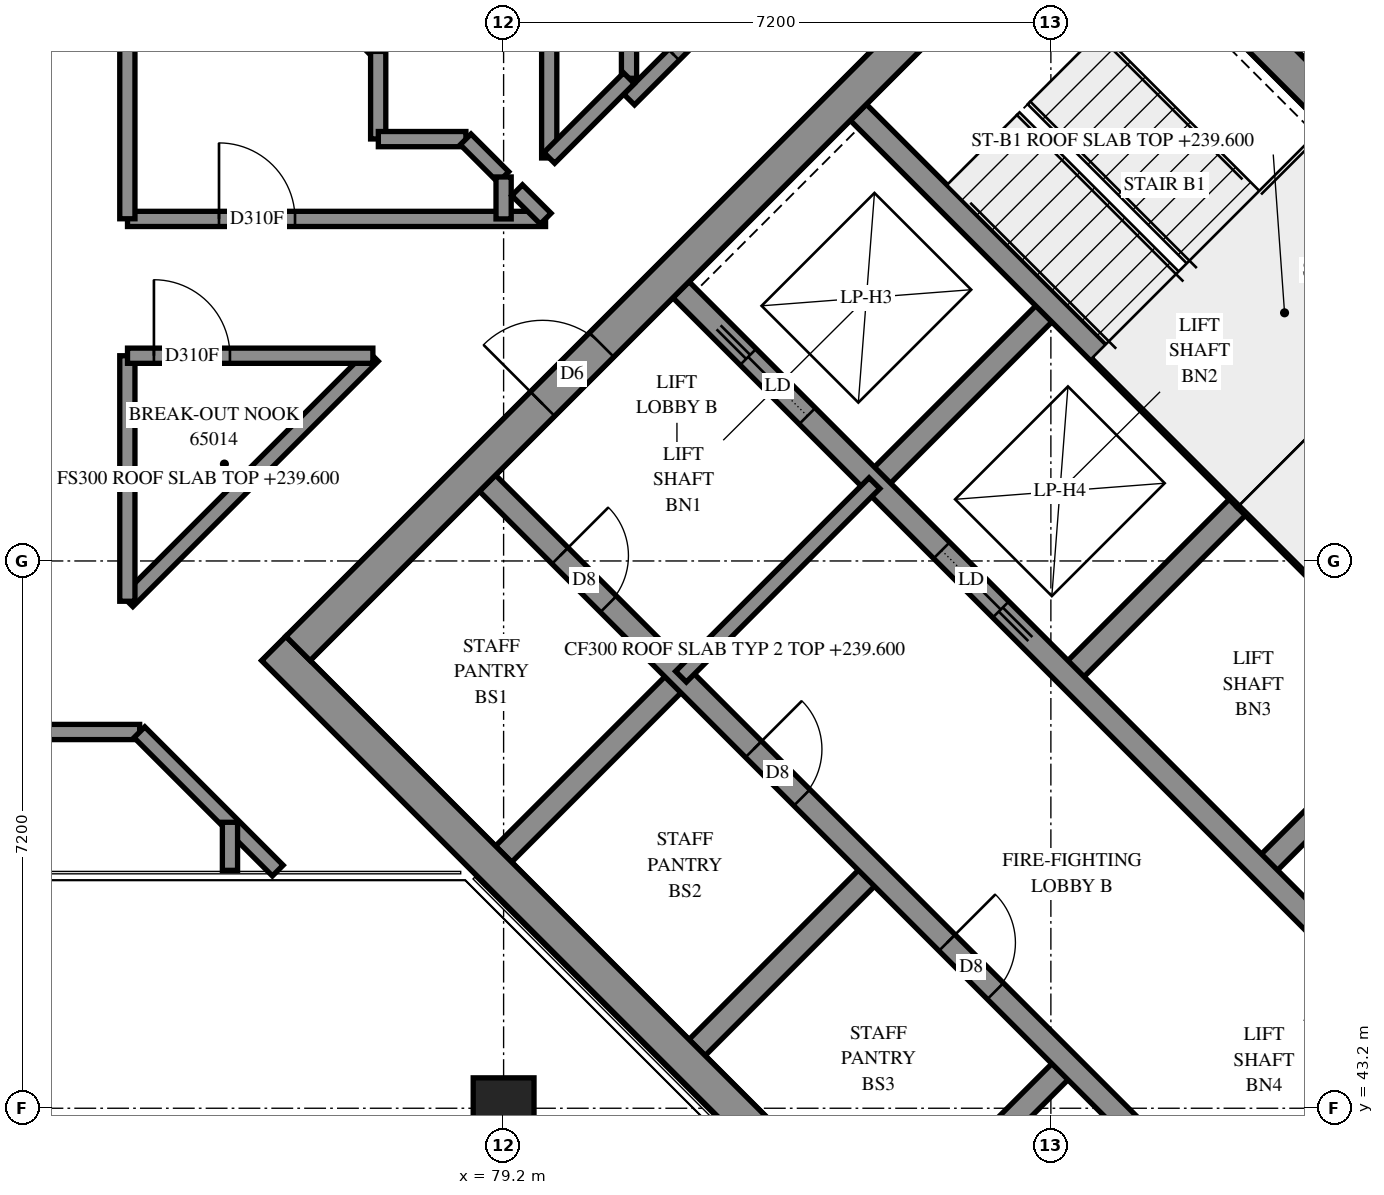
"""IFC4 building model, lengths in metres.
Left out: names, types, materials, properties, quantities, classifications, styles, units other than length and angle.
Written with IfcOpenShell. Run it as: python <this file> out.ifc"""

import sys

from ifc_helpers import new_model, si_unit, direction, frame, frame_2d, origin, origin_2d, place, context, subcontext, project, spatial, rectangle, extrude, element, fill, save


model = new_model("IFC4")
c1 = context("Model", 3, precision=1e-05, world=origin(), true_north=direction((0.0, 1.0)))
c2 = subcontext(c1, "Body", "Model", "MODEL_VIEW")
j1 = project(units=[si_unit("LENGTHUNIT", "METRE"), si_unit("PLANEANGLEUNIT", "RADIAN")], contexts=[c1])
p1 = place(None, origin())
s1 = spatial("IfcSite", under=j1, at=p1, CompositionType="ELEMENT")
p2 = place(p1, origin())
s2 = spatial("IfcBuilding", under=s1, at=p2, CompositionType="ELEMENT")
p3 = place(p2, frame((0.0, 0.0, 239.6)))
s3 = spatial("IfcBuildingStorey", under=s2, at=p3, CompositionType="ELEMENT", Elevation=239.6)
p4 = place(p3, frame((79.2, 43.2, 0.0), z_axis=(0.0, 0.0, 1.0), x_axis=(1.0, 0.0, 0.0)))
e1 = element("IfcColumn", 1, at=p4, inside=s3, PredefinedType="COLUMN", context=c2, shape_type="SweptSolid", body=[
    extrude(rectangle(XDim=0.8, YDim=0.8, at=origin_2d()), origin(), (0.0, 0.0, 1.0), 3.9),
])
p5 = place(p3, frame((76.177, 49.249, -0.3), z_axis=(0.0, 0.0, 1.0), x_axis=(0.7071100491, -0.7071035132, 0.0)))
e2 = element("IfcWall", 2, at=p5, inside=s3, PredefinedType="SHEAR", context=c2, shape_type="SweptSolid", body=[
    extrude(rectangle(XDim=15.3, YDim=0.45, at=frame_2d((7.65, 0.0))), origin(), (0.0, 0.0, 1.0), 3.5),
])
p6 = place(p3, frame((86.678, 59.749, -0.3), z_axis=(0.0, 0.0, 1.0), x_axis=(0.7071035132, -0.7071100491, 0.0)))
e3 = element("IfcWall", 3, at=p6, inside=s3, PredefinedType="SHEAR", context=c2, shape_type="SweptSolid", body=[
    extrude(rectangle(XDim=15.3, YDim=0.45, at=frame_2d((7.65, 0.0))), origin(), (0.0, 0.0, 1.0), 3.5),
])
p7 = place(p6, frame((10.45, 0.0, 0.3)))
e4 = element("IfcOpeningElement", 4, at=p7, cuts=e3, PredefinedType="OPENING", context=c2, shape_type="SweptSolid", body=[
    extrude(rectangle(XDim=0.8, YDim=2.1, at=frame_2d((0.4, 1.05))), frame((0.0, 0.235, 0.0), z_axis=(0.0, -1.0, 0.0), x_axis=(1.0, 0.0, 0.0)), (0.0, 0.0, 1.0), 0.47),
])
p8 = place(p3, frame((76.495, 49.249, -0.3), z_axis=(0.0, 0.0, 1.0), x_axis=(0.7071067812, 0.7071067812, 0.0)))
e5 = element("IfcWall", 5, at=p8, inside=s3, PredefinedType="SHEAR", context=c2, shape_type="SweptSolid", body=[
    extrude(rectangle(XDim=14.4, YDim=0.45, at=frame_2d((7.2, 0.0))), origin(), (0.0, 0.0, 1.0), 3.5),
])
p9 = place(p8, frame((4.55, 0.0, 0.3)))
e6 = element("IfcOpeningElement", 6, at=p9, cuts=e5, PredefinedType="OPENING", context=c2, shape_type="SweptSolid", body=[
    extrude(rectangle(XDim=1.1, YDim=2.1, at=frame_2d((0.55, 1.05))), frame((0.0, 0.235, 0.0), z_axis=(0.0, -1.0, 0.0), x_axis=(1.0, 0.0, 0.0)), (0.0, 0.0, 1.0), 0.47),
])
p10 = place(p8, frame((11.35, 0.0, 0.3)))
e7 = element("IfcOpeningElement", 7, at=p10, cuts=e5, PredefinedType="OPENING", context=c2, shape_type="SweptSolid", body=[
    extrude(rectangle(XDim=1.1, YDim=2.1, at=frame_2d((0.55, 1.05))), frame((0.0, 0.235, 0.0), z_axis=(0.0, -1.0, 0.0), x_axis=(1.0, 0.0, 0.0)), (0.0, 0.0, 1.0), 0.47),
])
p11 = place(p3, frame((86.996, 38.748, -0.3), z_axis=(0.0, 0.0, 1.0), x_axis=(0.7071067812, 0.7071067812, 0.0)))
e8 = element("IfcWall", 8, at=p11, inside=s3, PredefinedType="SHEAR", context=c2, shape_type="SweptSolid", body=[
    extrude(rectangle(XDim=14.4, YDim=0.45, at=frame_2d((7.2, 0.0))), origin(), (0.0, 0.0, 1.0), 3.5),
])
p12 = place(p11, frame((4.55, 0.0, 0.3)))
e9 = element("IfcOpeningElement", 9, at=p12, cuts=e8, PredefinedType="OPENING", context=c2, shape_type="SweptSolid", body=[
    extrude(rectangle(XDim=1.1, YDim=2.1, at=frame_2d((0.55, 1.05))), frame((0.0, 0.235, 0.0), z_axis=(0.0, -1.0, 0.0), x_axis=(1.0, 0.0, 0.0)), (0.0, 0.0, 1.0), 0.47),
])
p13 = place(p11, frame((11.35, 0.0, 0.3)))
e10 = element("IfcOpeningElement", 10, at=p13, cuts=e8, PredefinedType="OPENING", context=c2, shape_type="SweptSolid", body=[
    extrude(rectangle(XDim=1.1, YDim=2.1, at=frame_2d((0.55, 1.05))), frame((0.0, 0.235, 0.0), z_axis=(0.0, -1.0, 0.0), x_axis=(1.0, 0.0, 0.0)), (0.0, 0.0, 1.0), 0.47),
])
for number, where, z_axis, x_axis in (
    (11, (79.2, 46.544, 0.0), (0.0, 0.0, 1.0), (0.707, 0.707, 0.0)),
    (12, (84.079, 51.423, 0.0), (0.0, 0.0, 1.0), (0.707, 0.707, 0.0)),
):
    element("IfcWall", number, at=place(p3, frame(where, z_axis=z_axis, x_axis=x_axis)), inside=s3, PredefinedType="SOLIDWALL", context=c2, shape_type="SweptSolid", body=[
        extrude(rectangle(XDim=3.3, YDim=0.3, at=frame_2d((1.65, 0.0))), origin(), (0.0, 0.0, 1.0), 3.9),
    ])
p14 = place(p3, frame((81.746, 43.999, 0.0), z_axis=(0.0, 0.0, 1.0), x_axis=(0.7071067812, 0.7071067812, 0.0)))
e13 = element("IfcWall", 13, at=p14, inside=s3, PredefinedType="SOLIDWALL", context=c2, shape_type="SweptSolid", body=[
    extrude(rectangle(XDim=3.3, YDim=0.3, at=frame_2d((1.65, 0.0))), origin(), (0.0, 0.0, 1.0), 3.9),
])
p15 = place(p3, frame((86.625, 48.878, 0.0), z_axis=(0.0, 0.0, 1.0), x_axis=(0.7071067812, 0.7071067812, 0.0)))
e14 = element("IfcWall", 14, at=p15, inside=s3, PredefinedType="SOLIDWALL", context=c2, shape_type="SweptSolid", body=[
    extrude(rectangle(XDim=3.3, YDim=0.3, at=frame_2d((1.65, 0.0))), origin(), (0.0, 0.0, 1.0), 3.9),
])
p16 = place(p3, frame((84.291, 41.453, 0.0), z_axis=(0.0, 0.0, 1.0), x_axis=(0.7071067812, 0.7071067812, 0.0)))
e15 = element("IfcWall", 15, at=p16, inside=s3, PredefinedType="SOLIDWALL", context=c2, shape_type="SweptSolid", body=[
    extrude(rectangle(XDim=3.3, YDim=0.3, at=frame_2d((1.65, 0.0))), origin(), (0.0, 0.0, 1.0), 3.9),
])
p17 = place(p3, frame((89.17, 46.332, 0.0), z_axis=(0.0, 0.0, 1.0), x_axis=(0.7071067812, 0.7071067812, 0.0)))
e16 = element("IfcWall", 16, at=p17, inside=s3, PredefinedType="SOLIDWALL", context=c2, shape_type="SweptSolid", body=[
    extrude(rectangle(XDim=3.3, YDim=0.3, at=frame_2d((1.65, 0.0))), origin(), (0.0, 0.0, 1.0), 3.9),
])
p18 = place(p3, frame((78.988, 51.423, 0.0), z_axis=(0.0, 0.0, 1.0), x_axis=(0.7071067812, -0.7071067812, 0.0)))
e17 = element("IfcWall", 17, at=p18, inside=s3, PredefinedType="SOLIDWALL", context=c2, shape_type="SweptSolid", body=[
    extrude(rectangle(XDim=14.4, YDim=0.3, at=frame_2d((7.2, 0.0))), origin(), (0.0, 0.0, 1.0), 3.9),
])
p19 = place(p18, frame((1.35, 0.0, 0.0)))
e18 = element("IfcOpeningElement", 18, at=p19, cuts=e17, PredefinedType="OPENING", context=c2, shape_type="SweptSolid", body=[
    extrude(rectangle(XDim=0.9, YDim=2.1, at=frame_2d((0.45, 1.05))), frame((0.0, 0.16, 0.0), z_axis=(0.0, -1.0, 0.0), x_axis=(1.0, 0.0, 0.0)), (0.0, 0.0, 1.0), 0.32),
])
p20 = place(p18, frame((4.95, 0.0, 0.0)))
e19 = element("IfcOpeningElement", 19, at=p20, cuts=e17, PredefinedType="OPENING", context=c2, shape_type="SweptSolid", body=[
    extrude(rectangle(XDim=0.9, YDim=2.1, at=frame_2d((0.45, 1.05))), frame((0.0, 0.16, 0.0), z_axis=(0.0, -1.0, 0.0), x_axis=(1.0, 0.0, 0.0)), (0.0, 0.0, 1.0), 0.32),
])
p21 = place(p18, frame((8.55, 0.0, 0.0)))
e20 = element("IfcOpeningElement", 20, at=p21, cuts=e17, PredefinedType="OPENING", context=c2, shape_type="SweptSolid", body=[
    extrude(rectangle(XDim=0.9, YDim=2.1, at=frame_2d((0.45, 1.05))), frame((0.0, 0.16, 0.0), z_axis=(0.0, -1.0, 0.0), x_axis=(1.0, 0.0, 0.0)), (0.0, 0.0, 1.0), 0.32),
])
p22 = place(p18, frame((12.05, 0.0, 0.0)))
e21 = element("IfcOpeningElement", 21, at=p22, cuts=e17, PredefinedType="OPENING", context=c2, shape_type="SweptSolid", body=[
    extrude(rectangle(XDim=1.1, YDim=2.1, at=frame_2d((0.55, 1.05))), frame((0.0, 0.16, 0.0), z_axis=(0.0, -1.0, 0.0), x_axis=(1.0, 0.0, 0.0)), (0.0, 0.0, 1.0), 0.32),
])
p23 = place(p3, frame((81.534, 53.969, 0.0), z_axis=(0.0, 0.0, 1.0), x_axis=(0.707103309, -0.7071102534, 0.0)))
e22 = element("IfcWall", 22, at=p23, inside=s3, PredefinedType="SOLIDWALL", context=c2, shape_type="SweptSolid", body=[
    extrude(rectangle(XDim=14.4, YDim=0.3, at=frame_2d((7.2, 0.0))), origin(), (0.0, 0.0, 1.0), 3.9),
])
p24 = place(p23, frame((1.25, 0.0, 0.0)))
e23 = element("IfcOpeningElement", 23, at=p24, cuts=e22, PredefinedType="OPENING", context=c2, shape_type="SweptSolid", body=[
    extrude(rectangle(XDim=1.1, YDim=2.1, at=frame_2d((0.55, 1.05))), frame((0.0, 0.16, 0.0), z_axis=(0.0, -1.0, 0.0), x_axis=(1.0, 0.0, 0.0)), (0.0, 0.0, 1.0), 0.32),
])
p25 = place(p23, frame((4.85, 0.0, 0.0)))
e24 = element("IfcOpeningElement", 24, at=p25, cuts=e22, PredefinedType="OPENING", context=c2, shape_type="SweptSolid", body=[
    extrude(rectangle(XDim=1.1, YDim=2.1, at=frame_2d((0.55, 1.05))), frame((0.0, 0.16, 0.0), z_axis=(0.0, -1.0, 0.0), x_axis=(1.0, 0.0, 0.0)), (0.0, 0.0, 1.0), 0.32),
])
p26 = place(p23, frame((12.05, 0.0, 0.0)))
e25 = element("IfcOpeningElement", 25, at=p26, cuts=e22, PredefinedType="OPENING", context=c2, shape_type="SweptSolid", body=[
    extrude(rectangle(XDim=1.1, YDim=2.1, at=frame_2d((0.55, 1.05))), frame((0.0, 0.16, 0.0), z_axis=(0.0, -1.0, 0.0), x_axis=(1.0, 0.0, 0.0)), (0.0, 0.0, 1.0), 0.32),
])
for number, where, z_axis, x_axis in (
    (26, (83.867, 56.302, 0.0), (0.0, 0.0, 1.0), (0.707, -0.707, 0.0)),
    (27, (88.958, 51.211, 0.0), (0.0, 0.0, 1.0), (0.707, -0.707, 0.0)),
):
    element("IfcWall", number, at=place(p3, frame(where, z_axis=z_axis, x_axis=x_axis)), inside=s3, PredefinedType="SOLIDWALL", context=c2, shape_type="SweptSolid", body=[
        extrude(rectangle(XDim=7.2, YDim=0.3, at=frame_2d((3.6, 0.0))), origin(), (0.0, 0.0, 1.0), 3.9),
    ])
p27 = place(p3, frame((88.958, 51.211, 0.0), z_axis=(0.0, 0.0, 1.0), x_axis=(0.7071067812, 0.7071067812, 0.0)))
e28 = element("IfcWall", 28, at=p27, inside=s3, PredefinedType="SOLIDWALL", context=c2, shape_type="SweptSolid", body=[
    extrude(rectangle(XDim=4.2, YDim=0.3, at=frame_2d((2.1, 0.0))), origin(), (0.0, 0.0, 1.0), 3.9),
])
p28 = place(p3, frame((81.534, 48.878, 0.0), z_axis=(0.0, 0.0, 1.0), x_axis=(0.707092892, 0.7071206701, 0.0)))
e29 = element("IfcWall", 29, at=p28, inside=s3, PredefinedType="PARTITIONING", context=c2, shape_type="SweptSolid", body=[
    extrude(rectangle(XDim=3.6, YDim=0.2, at=frame_2d((1.8, 0.0))), origin(), (0.0, 0.0, 1.0), 3.9),
])
p29 = place(p3, frame((55.352, 48.15, 0.0), z_axis=(0.0, 0.0, 1.0), x_axis=(1.0, 0.0, 0.0)))
e30 = element("IfcWall", 30, at=p29, inside=s3, PredefinedType="PARTITIONING", context=c2, shape_type="SweptSolid", body=[
    extrude(rectangle(XDim=19.06, YDim=0.2, at=frame_2d((9.53, 0.0))), origin(), (0.0, 0.0, 1.0), 3.9),
])
p30 = place(p29, frame((11.608, 0.0, 0.0)))
e31 = element("IfcOpeningElement", 31, at=p30, cuts=e30, PredefinedType="OPENING", context=c2, shape_type="SweptSolid", body=[
    extrude(rectangle(XDim=1.0, YDim=2.1, at=frame_2d((0.5, 1.05))), frame((0.0, 0.11, 0.0), z_axis=(0.0, -1.0, 0.0), x_axis=(1.0, 0.0, 0.0)), (0.0, 0.0, 1.0), 0.22),
])
p31 = place(p3, frame((80.852, 56.471, 0.0), z_axis=(0.0, 0.0, 1.0), x_axis=(0.7071067812, 0.7071067812, 0.0)))
e32 = element("IfcWall", 32, at=p31, inside=s3, PredefinedType="PARTITIONING", context=c2, shape_type="SweptSolid", body=[
    extrude(rectangle(XDim=6.684, YDim=0.2, at=frame_2d((3.342, 0.0))), origin(), (0.0, 0.0, 1.0), 3.9),
])
p32 = place(p31, frame((0.832, 0.0, 0.0)))
e33 = element("IfcOpeningElement", 33, at=p32, cuts=e32, PredefinedType="OPENING", context=c2, shape_type="SweptSolid", body=[
    extrude(rectangle(XDim=1.0, YDim=2.1, at=frame_2d((0.5, 1.05))), frame((0.0, 0.11, 0.0), z_axis=(0.0, -1.0, 0.0), x_axis=(1.0, 0.0, 0.0)), (0.0, 0.0, 1.0), 0.22),
])
p33 = place(p3, frame((74.252, 54.9, 0.0), z_axis=(0.0, 0.0, 1.0), x_axis=(1.0, 0.0, 0.0)))
e34 = element("IfcWall", 34, at=p33, inside=s3, PredefinedType="PARTITIONING", context=c2, shape_type="SweptSolid", body=[
    extrude(rectangle(XDim=5.5, YDim=0.2, at=frame_2d((2.75, 0.0))), origin(), (0.0, 0.0, 1.0), 3.9),
])
p34 = place(p33, frame((1.204, 0.0, 0.0)))
e35 = element("IfcOpeningElement", 35, at=p34, cuts=e34, PredefinedType="OPENING", context=c2, shape_type="SweptSolid", body=[
    extrude(rectangle(XDim=1.0, YDim=2.1, at=frame_2d((0.5, 1.05))), frame((0.0, 0.11, 0.0), z_axis=(0.0, -1.0, 0.0), x_axis=(1.0, 0.0, 0.0)), (0.0, 0.0, 1.0), 0.22),
])
p35 = place(p3, frame((74.25, 54.902, 0.0), z_axis=(0.0, 0.0, 1.0), x_axis=(0.0, 1.0, 0.0)))
e36 = element("IfcWall", 36, at=p35, inside=s3, PredefinedType="PARTITIONING", context=c2, shape_type="SweptSolid", body=[
    extrude(rectangle(XDim=5.5, YDim=0.2, at=frame_2d((2.75, 0.0))), origin(), (0.0, 0.0, 1.0), 3.9),
])
p36 = place(p3, frame((74.251, 49.87, 0.0), z_axis=(0.0, 0.0, 1.0), x_axis=(0.7071067812, 0.7071067812, 0.0)))
e37 = element("IfcWall", 37, at=p36, inside=s3, PredefinedType="PARTITIONING", context=c2, shape_type="SweptSolid", body=[
    extrude(rectangle(XDim=4.565, YDim=0.2, at=frame_2d((2.283, 0.0))), origin(), (0.0, 0.0, 1.0), 3.9),
])
p37 = place(p3, frame((74.447, 60.201, 0.0), z_axis=(0.0, 0.0, 1.0), x_axis=(0.7071067812, -0.7071067812, 0.0)))
e38 = element("IfcWall", 38, at=p37, inside=s3, PredefinedType="PARTITIONING", context=c2, shape_type="SweptSolid", body=[
    extrude(rectangle(XDim=4.384, YDim=0.2, at=frame_2d((2.192, 0.0))), origin(), (0.0, 0.0, 1.0), 3.9),
])
p38 = place(p3, frame((79.8, 55.702, 0.0), z_axis=(0.0, 0.0, 1.0), x_axis=(0.0, 1.0, 0.0)))
e39 = element("IfcWall", 39, at=p38, inside=s3, PredefinedType="PARTITIONING", context=c2, shape_type="SweptSolid", body=[
    extrude(rectangle(XDim=3.548, YDim=0.2, at=frame_2d((1.774, 0.0))), origin(), (0.0, 0.0, 1.0), 3.9),
])
p39 = place(p3, frame((74.25, 49.87, 0.0), z_axis=(0.0, 0.0, 1.0), x_axis=(0.0, 1.0, 0.0)))
e40 = element("IfcWall", 40, at=p39, inside=s3, PredefinedType="PARTITIONING", context=c2, shape_type="SweptSolid", body=[
    extrude(rectangle(XDim=3.23, YDim=0.2, at=frame_2d((1.615, 0.0))), origin(), (0.0, 0.0, 1.0), 3.9),
])
p40 = place(p3, frame((74.252, 53.1, 0.0), z_axis=(0.0, 0.0, 1.0), x_axis=(1.0, 0.0, 0.0)))
e41 = element("IfcWall", 41, at=p40, inside=s3, PredefinedType="PARTITIONING", context=c2, shape_type="SweptSolid", body=[
    extrude(rectangle(XDim=3.228, YDim=0.2, at=frame_2d((1.614, 0.0))), origin(), (0.0, 0.0, 1.0), 3.9),
])
p41 = place(p40, frame((0.347, 0.0, 0.0)))
e42 = element("IfcOpeningElement", 42, at=p41, cuts=e41, PredefinedType="OPENING", context=c2, shape_type="SweptSolid", body=[
    extrude(rectangle(XDim=1.0, YDim=2.1, at=frame_2d((0.5, 1.05))), frame((0.0, 0.11, 0.0), z_axis=(0.0, -1.0, 0.0), x_axis=(1.0, 0.0, 0.0)), (0.0, 0.0, 1.0), 0.22),
])
p42 = place(p3, frame((74.409, 48.147, 0.0), z_axis=(0.0, 0.0, 1.0), x_axis=(0.7071067812, -0.7071067812, 0.0)))
e43 = element("IfcWall", 43, at=p42, inside=s3, PredefinedType="PARTITIONING", context=c2, shape_type="SweptSolid", body=[
    extrude(rectangle(XDim=2.574, YDim=0.2, at=frame_2d((1.287, 0.0))), origin(), (0.0, 0.0, 1.0), 3.9),
])
p43 = place(p3, frame((80.85, 56.75, 0.0), z_axis=(0.0, 0.0, 1.0), x_axis=(0.0, 1.0, 0.0)))
e44 = element("IfcWall", 44, at=p43, inside=s3, PredefinedType="PARTITIONING", context=c2, shape_type="SweptSolid", body=[
    extrude(rectangle(XDim=2.498, YDim=0.2, at=frame_2d((1.249, 0.0))), origin(), (0.0, 0.0, 1.0), 3.9),
])
p44 = place(p3, frame((79.801, 55.703, 0.0), z_axis=(0.0, 0.0, 1.0), x_axis=(0.7071067812, 0.7071067812, 0.0)))
e45 = element("IfcWall", 45, at=p44, inside=s3, PredefinedType="PARTITIONING", context=c2, shape_type="SweptSolid", body=[
    extrude(rectangle(XDim=1.482, YDim=0.2, at=frame_2d((0.741, 0.0))), origin(), (0.0, 0.0, 1.0), 3.9),
])
for number, where, z_axis, x_axis in (
    (46, (77.55, 55.952, 0.0), (0.0, 0.0, 1.0), (0.0, 1.0, 0.0)),
    (47, (77.552, 55.95, 0.0), (0.0, 0.0, 1.0), (1.0, 0.0, 0.0)),
):
    element("IfcWall", number, at=place(p3, frame(where, z_axis=z_axis, x_axis=x_axis)), inside=s3, PredefinedType="PARTITIONING", context=c2, shape_type="SweptSolid", body=[
        extrude(rectangle(XDim=1.152, YDim=0.2, at=frame_2d((0.576, 0.0))), origin(), (0.0, 0.0, 1.0), 3.9),
    ])
p45 = place(p3, frame((78.701, 55.947, 0.0), z_axis=(0.0, 0.0, 1.0), x_axis=(0.7071067812, -0.7071067812, 0.0)))
e48 = element("IfcWall", 48, at=p45, inside=s3, PredefinedType="PARTITIONING", context=c2, shape_type="SweptSolid", body=[
    extrude(rectangle(XDim=0.701, YDim=0.2, at=frame_2d((0.351, 0.0))), origin(), (0.0, 0.0, 1.0), 3.9),
])
p46 = place(p3, frame((75.6, 46.33, 0.0), z_axis=(0.0, 0.0, 1.0), x_axis=(0.0, 1.0, 0.0)))
e49 = element("IfcWall", 49, at=p46, inside=s3, PredefinedType="PARTITIONING", context=c2, shape_type="SweptSolid", body=[
    extrude(rectangle(XDim=0.632, YDim=0.2, at=frame_2d((0.316, 0.0))), origin(), (0.0, 0.0, 1.0), 3.9),
])
p47 = place(p3, frame((79.2, 54.9, 0.0), z_axis=(0.0, 0.0, 1.0), x_axis=(0.0, 1.0, 0.0)))
e50 = element("IfcWall", 50, at=p47, inside=s3, PredefinedType="PARTITIONING", context=c2, shape_type="SweptSolid", body=[
    extrude(rectangle(XDim=0.552, YDim=0.2, at=frame_2d((0.276, 0.0))), origin(), (0.0, 0.0, 1.0), 3.9),
])
p48 = place(p3, frame((79.378, 55.278, 0.0), z_axis=(0.0, 0.0, 1.0), x_axis=(0.7089898784, -0.7052186557, 0.0)))
e51 = element("IfcWall", 51, at=p48, inside=s3, PredefinedType="PARTITIONING", context=c2, shape_type="SweptSolid", body=[
    extrude(rectangle(XDim=0.53, YDim=0.2, at=frame_2d((0.265, 0.0))), origin(), (0.0, 0.0, 1.0), 3.9),
])
p49 = place(p9, origin())
e52 = element("IfcDoor", 52, at=p49, inside=s3, OperationType="DOUBLE_DOOR_SINGLE_SWING", PredefinedType="DOOR", context=c2, shape_type="SweptSolid", body=[
    extrude(rectangle(XDim=1.1, YDim=2.1, at=frame_2d((0.55, 1.05))), frame((0.0, 0.025, 0.0), z_axis=(0.0, -1.0, 0.0), x_axis=(1.0, 0.0, 0.0)), (0.0, 0.0, 1.0), 0.05),
])
fill(e6, e52)
p50 = place(p19, origin())
e53 = element("IfcDoor", 53, at=p50, inside=s3, OperationType="SINGLE_SWING_LEFT", PredefinedType="DOOR", context=c2, shape_type="SweptSolid", body=[
    extrude(rectangle(XDim=0.9, YDim=2.1, at=frame_2d((0.45, 1.05))), frame((0.0, 0.025, 0.0), z_axis=(0.0, -1.0, 0.0), x_axis=(1.0, 0.0, 0.0)), (0.0, 0.0, 1.0), 0.05),
])
fill(e18, e53)
p51 = place(p20, origin())
e54 = element("IfcDoor", 54, at=p51, inside=s3, OperationType="SINGLE_SWING_LEFT", PredefinedType="DOOR", context=c2, shape_type="SweptSolid", body=[
    extrude(rectangle(XDim=0.9, YDim=2.1, at=frame_2d((0.45, 1.05))), frame((0.0, 0.025, 0.0), z_axis=(0.0, -1.0, 0.0), x_axis=(1.0, 0.0, 0.0)), (0.0, 0.0, 1.0), 0.05),
])
fill(e19, e54)
p52 = place(p21, origin())
e55 = element("IfcDoor", 55, at=p52, inside=s3, OperationType="SINGLE_SWING_LEFT", PredefinedType="DOOR", context=c2, shape_type="SweptSolid", body=[
    extrude(rectangle(XDim=0.9, YDim=2.1, at=frame_2d((0.45, 1.05))), frame((0.0, 0.025, 0.0), z_axis=(0.0, -1.0, 0.0), x_axis=(1.0, 0.0, 0.0)), (0.0, 0.0, 1.0), 0.05),
])
fill(e20, e55)
p53 = place(p24, origin())
e56 = element("IfcDoor", 56, at=p53, inside=s3, OperationType="SLIDING_TO_LEFT", PredefinedType="DOOR", context=c2, shape_type="SweptSolid", body=[
    extrude(rectangle(XDim=1.1, YDim=2.1, at=frame_2d((0.55, 1.05))), frame((0.0, 0.025, 0.0), z_axis=(0.0, -1.0, 0.0), x_axis=(1.0, 0.0, 0.0)), (0.0, 0.0, 1.0), 0.05),
])
fill(e23, e56)
p54 = place(p25, origin())
e57 = element("IfcDoor", 57, at=p54, inside=s3, OperationType="SLIDING_TO_RIGHT", PredefinedType="DOOR", context=c2, shape_type="SweptSolid", body=[
    extrude(rectangle(XDim=1.1, YDim=2.1, at=frame_2d((0.55, 1.05))), frame((0.0, 0.025, 0.0), z_axis=(0.0, -1.0, 0.0), x_axis=(1.0, 0.0, 0.0)), (0.0, 0.0, 1.0), 0.05),
])
fill(e24, e57)
p55 = place(p41, origin())
e58 = element("IfcDoor", 58, at=p55, inside=s3, OperationType="SINGLE_SWING_RIGHT", PredefinedType="DOOR", context=c2, shape_type="SweptSolid", body=[
    extrude(rectangle(XDim=1.0, YDim=2.1, at=frame_2d((0.5, 1.05))), frame((0.0, 0.025, 0.0), z_axis=(0.0, -1.0, 0.0), x_axis=(1.0, 0.0, 0.0)), (0.0, 0.0, 1.0), 0.05),
])
fill(e42, e58)
p56 = place(p34, origin())
e59 = element("IfcDoor", 59, at=p56, inside=s3, OperationType="SINGLE_SWING_LEFT", PredefinedType="DOOR", context=c2, shape_type="SweptSolid", body=[
    extrude(rectangle(XDim=1.0, YDim=2.1, at=frame_2d((0.5, 1.05))), frame((0.0, 0.025, 0.0), z_axis=(0.0, -1.0, 0.0), x_axis=(1.0, 0.0, 0.0)), (0.0, 0.0, 1.0), 0.05),
])
fill(e35, e59)
p57 = place(p32, origin())
e60 = element("IfcDoor", 60, at=p57, inside=s3, OperationType="SINGLE_SWING_RIGHT", PredefinedType="DOOR", context=c2, shape_type="SweptSolid", body=[
    extrude(rectangle(XDim=1.0, YDim=2.1, at=frame_2d((0.5, 1.05))), frame((0.0, 0.025, 0.0), z_axis=(0.0, -1.0, 0.0), x_axis=(1.0, 0.0, 0.0)), (0.0, 0.0, 1.0), 0.05),
])
fill(e33, e60)
save(model, sys.argv[1])
